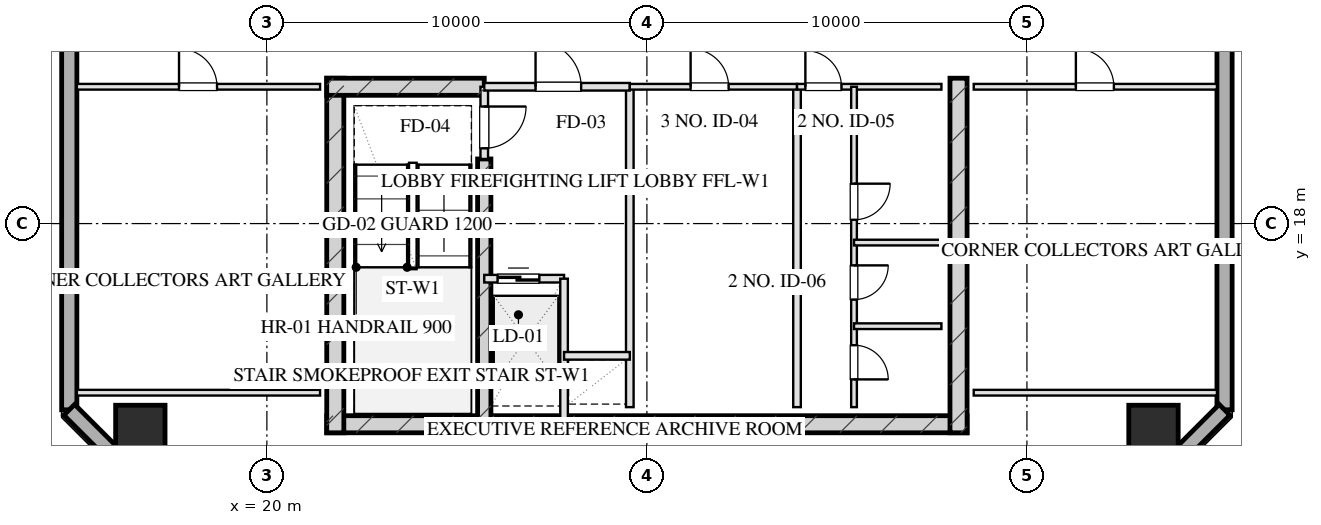
"""IFC4 building model, lengths in metres.
Left out: names, types, materials, properties, quantities, classifications, styles, units other than length and angle.
Written with IfcOpenShell. Run it as: python <this file> out.ifc"""

import sys

from ifc_helpers import new_model, si_unit, direction, frame, frame_2d, origin, origin_2d, place, context, subcontext, project, spatial, rectangle, hollow_rectangle, extrude, element, fill, save


model = new_model("IFC4")
c1 = context("Model", 3, precision=1e-05, world=origin(), true_north=direction((0.0, 1.0)))
c2 = subcontext(c1, "Body", "Model", "MODEL_VIEW")
j1 = project(units=[si_unit("LENGTHUNIT", "METRE"), si_unit("PLANEANGLEUNIT", "RADIAN")], contexts=[c1])
p1 = place(None, origin())
s1 = spatial("IfcSite", under=j1, at=p1, CompositionType="ELEMENT")
p2 = place(p1, origin())
s2 = spatial("IfcBuilding", under=s1, at=p2, CompositionType="ELEMENT")
p3 = place(p2, frame((0.0, 0.0, 247.2)))
s3 = spatial("IfcBuildingStorey", under=s2, at=p3, CompositionType="ELEMENT", Elevation=247.2)
p4 = place(p3, frame((21.575, 12.72, 0.0), z_axis=(0.0, 0.0, 1.0), x_axis=(1.0, 0.0, 0.0)))
e1 = element("IfcWall", 1, at=p4, inside=s3, PredefinedType="SHEAR", context=c2, shape_type="SweptSolid", body=[
    extrude(rectangle(XDim=16.85, YDim=0.45, at=frame_2d((8.425, 0.0))), origin(), (0.0, 0.0, 1.0), 3.2),
])
for number, where, z_axis, x_axis in (
    (2, (21.8, 21.825, 0.0), (0.0, 0.0, 1.0), (0.0, -1.0, 0.0)),
    (3, (38.2, 21.825, 0.0), (0.0, 0.0, 1.0), (0.0, -1.0, 0.0)),
):
    element("IfcWall", number, at=place(p3, frame(where, z_axis=z_axis, x_axis=x_axis)), inside=s3, PredefinedType="SHEAR", context=c2, shape_type="SweptSolid", body=[
        extrude(rectangle(XDim=9.33, YDim=0.45, at=frame_2d((4.665, 0.0))), origin(), (0.0, 0.0, 1.0), 3.2),
    ])
p5 = place(p3, frame((25.72, 19.7, 0.0), z_axis=(0.0, 0.0, 1.0), x_axis=(0.0, -1.0, 0.0)))
e4 = element("IfcWall", 4, at=p5, inside=s3, PredefinedType="SHEAR", context=c2, shape_type="SweptSolid", body=[
    extrude(rectangle(XDim=6.98, YDim=0.35, at=frame_2d((3.49, 0.0))), origin(), (0.0, 0.0, 1.0), 3.2),
])
p6 = place(p3, frame((21.575, 21.6, 0.0), z_axis=(0.0, 0.0, 1.0), x_axis=(1.0, 0.0, 0.0)))
e5 = element("IfcWall", 5, at=p6, inside=s3, PredefinedType="SHEAR", context=c2, shape_type="SweptSolid", body=[
    extrude(rectangle(XDim=4.145, YDim=0.45, at=frame_2d((2.073, 0.0))), origin(), (0.0, 0.0, 1.0), 3.2),
])
for number, where, z_axis, x_axis in (
    (6, (16.67, 12.57, 0.0), (0.0, 0.0, 1.0), (1.0, 0.0, 0.0)),
    (7, (43.33, 12.57, 0.0), (0.0, 0.0, 1.0), (1.0, 0.0, 0.0)),
):
    element("IfcColumn", number, at=place(p3, frame(where, z_axis=z_axis, x_axis=x_axis)), inside=s3, PredefinedType="COLUMN", context=c2, shape_type="SweptSolid", body=[
        extrude(hollow_rectangle(XDim=1.3, YDim=1.3, WallThickness=0.045, at=origin_2d()), origin(), (0.0, 0.0, 1.0), 3.201),
    ])
p7 = place(p3, frame((14.8, 13.1, 0.0), z_axis=(0.0, 0.0, 1.0), x_axis=(0.0, 1.0, 0.0)))
e8 = element("IfcWall", 8, at=p7, inside=s3, PredefinedType="SOLIDWALL", context=c2, shape_type="SweptSolid", body=[
    extrude(rectangle(XDim=41.8, YDim=0.4, at=frame_2d((20.9, 0.0))), origin(), (0.0, 0.0, 1.0), 2.36),
])
p8 = place(p7, frame((13.525, 0.0, 0.75)))
e9 = element("IfcOpeningElement", 9, at=p8, cuts=e8, PredefinedType="OPENING", context=c2, shape_type="SweptSolid", body=[
    extrude(rectangle(XDim=1.95, YDim=1.21, at=frame_2d((0.975, 0.605))), frame((0.0, 0.21, 0.0), z_axis=(0.0, -1.0, 0.0), x_axis=(1.0, 0.0, 0.0)), (0.0, 0.0, 1.0), 0.42),
])
p9 = place(p7, frame((17.325, 0.0, 0.75)))
e10 = element("IfcOpeningElement", 10, at=p9, cuts=e8, PredefinedType="OPENING", context=c2, shape_type="SweptSolid", body=[
    extrude(rectangle(XDim=1.95, YDim=1.21, at=frame_2d((0.975, 0.605))), frame((0.0, 0.21, 0.0), z_axis=(0.0, -1.0, 0.0), x_axis=(1.0, 0.0, 0.0)), (0.0, 0.0, 1.0), 0.42),
])
p10 = place(p7, frame((23.2, 0.0, 0.0)))
e11 = element("IfcOpeningElement", 11, at=p10, cuts=e8, PredefinedType="OPENING", context=c2, shape_type="SweptSolid", body=[
    extrude(rectangle(XDim=1.1, YDim=2.15, at=frame_2d((0.55, 1.075))), frame((0.0, 0.21, 0.0), z_axis=(0.0, -1.0, 0.0), x_axis=(1.0, 0.0, 0.0)), (0.0, 0.0, 1.0), 0.42),
])
p11 = place(p3, frame((45.2, 54.9, 0.0), z_axis=(0.0, 0.0, 1.0), x_axis=(0.0, -1.0, 0.0)))
e12 = element("IfcWall", 12, at=p11, inside=s3, PredefinedType="SOLIDWALL", context=c2, shape_type="SweptSolid", body=[
    extrude(rectangle(XDim=41.8, YDim=0.4, at=frame_2d((20.9, 0.0))), origin(), (0.0, 0.0, 1.0), 2.36),
])
p12 = place(p11, frame((26.325, 0.0, 0.75)))
e13 = element("IfcOpeningElement", 13, at=p12, cuts=e12, PredefinedType="OPENING", context=c2, shape_type="SweptSolid", body=[
    extrude(rectangle(XDim=1.95, YDim=1.21, at=frame_2d((0.975, 0.605))), frame((0.0, 0.21, 0.0), z_axis=(0.0, -1.0, 0.0), x_axis=(1.0, 0.0, 0.0)), (0.0, 0.0, 1.0), 0.42),
])
p13 = place(p11, frame((22.525, 0.0, 0.75)))
e14 = element("IfcOpeningElement", 14, at=p13, cuts=e12, PredefinedType="OPENING", context=c2, shape_type="SweptSolid", body=[
    extrude(rectangle(XDim=1.95, YDim=1.21, at=frame_2d((0.975, 0.605))), frame((0.0, 0.21, 0.0), z_axis=(0.0, -1.0, 0.0), x_axis=(1.0, 0.0, 0.0)), (0.0, 0.0, 1.0), 0.42),
])
p14 = place(p11, frame((17.5, 0.0, 0.0)))
e15 = element("IfcOpeningElement", 15, at=p14, cuts=e12, PredefinedType="OPENING", context=c2, shape_type="SweptSolid", body=[
    extrude(rectangle(XDim=1.1, YDim=2.15, at=frame_2d((0.55, 1.075))), frame((0.0, 0.21, 0.0), z_axis=(0.0, -1.0, 0.0), x_axis=(1.0, 0.0, 0.0)), (0.0, 0.0, 1.0), 0.42),
])
for number, where, z_axis, x_axis in (
    (16, (45.2, 13.1, 0.0), (0.0, 0.0, 1.0), (-0.707, -0.707, 0.0)),
    (17, (17.2, 10.7, 0.0), (0.0, 0.0, 1.0), (-0.707, 0.707, 0.0)),
):
    element("IfcWall", number, at=place(p3, frame(where, z_axis=z_axis, x_axis=x_axis)), inside=s3, PredefinedType="SOLIDWALL", context=c2, shape_type="SweptSolid", body=[
        extrude(rectangle(XDim=3.394, YDim=0.4, at=frame_2d((1.697, 0.0))), origin(), (0.0, 0.0, 1.0), 2.36),
    ])
p15 = place(p3, frame((25.72, 21.6, 0.0), z_axis=(0.0, 0.0, 1.0), x_axis=(0.0, -1.0, 0.0)))
e18 = element("IfcWall", 18, at=p15, inside=s3, PredefinedType="PARTITIONING", context=c2, shape_type="SweptSolid", body=[
    extrude(rectangle(XDim=1.9, YDim=0.2, at=frame_2d((0.95, 0.0))), origin(), (0.0, 0.0, 1.0), 2.925),
])
p16 = place(p15, frame((0.52, 0.0, 0.0)))
e19 = element("IfcOpeningElement", 19, at=p16, cuts=e18, PredefinedType="OPENING", context=c2, shape_type="SweptSolid", body=[
    extrude(rectangle(XDim=1.1, YDim=2.05, at=frame_2d((0.55, 1.025))), frame((0.0, 0.11, 0.0), z_axis=(0.0, -1.0, 0.0), x_axis=(1.0, 0.0, 0.0)), (0.0, 0.0, 1.0), 0.22),
])
p17 = place(p3, frame((29.55, 21.6, 0.0), z_axis=(0.0, 0.0, 1.0), x_axis=(0.0, -1.0, 0.0)))
e20 = element("IfcWall", 20, at=p17, inside=s3, PredefinedType="PARTITIONING", context=c2, shape_type="SweptSolid", body=[
    extrude(rectangle(XDim=8.43, YDim=0.2, at=frame_2d((4.215, 0.0))), origin(), (0.0, 0.0, 1.0), 2.925),
])
p18 = place(p3, frame((25.72, 21.6, 0.0), z_axis=(0.0, 0.0, 1.0), x_axis=(1.0, 0.0, 0.0)))
e21 = element("IfcWall", 21, at=p18, inside=s3, PredefinedType="PARTITIONING", context=c2, shape_type="SweptSolid", body=[
    extrude(rectangle(XDim=3.83, YDim=0.2, at=frame_2d((1.915, 0.0))), origin(), (0.0, 0.0, 1.0), 2.925),
])
p19 = place(p18, frame((1.35, 0.0, 0.0)))
e22 = element("IfcOpeningElement", 22, at=p19, cuts=e21, PredefinedType="OPENING", context=c2, shape_type="SweptSolid", body=[
    extrude(rectangle(XDim=1.2, YDim=2.05, at=frame_2d((0.6, 1.025))), frame((0.0, 0.11, 0.0), z_axis=(0.0, -1.0, 0.0), x_axis=(1.0, 0.0, 0.0)), (0.0, 0.0, 1.0), 0.22),
])
p20 = place(p3, frame((25.72, 16.55, 0.0), z_axis=(0.0, 0.0, 1.0), x_axis=(1.0, 0.0, 0.0)))
e23 = element("IfcWall", 23, at=p20, inside=s3, PredefinedType="PARTITIONING", context=c2, shape_type="SweptSolid", body=[
    extrude(rectangle(XDim=2.1, YDim=0.2, at=frame_2d((1.05, 0.0))), origin(), (0.0, 0.0, 1.0), 2.925),
])
p21 = place(p20, frame((0.35, 0.0, 0.0)))
e24 = element("IfcOpeningElement", 24, at=p21, cuts=e23, PredefinedType="OPENING", context=c2, shape_type="SweptSolid", body=[
    extrude(rectangle(XDim=1.1, YDim=2.05, at=frame_2d((0.55, 1.025))), frame((0.0, 0.11, 0.0), z_axis=(0.0, -1.0, 0.0), x_axis=(1.0, 0.0, 0.0)), (0.0, 0.0, 1.0), 0.22),
])
p22 = place(p3, frame((27.82, 16.55, 0.0), z_axis=(0.0, 0.0, 1.0), x_axis=(0.0, -1.0, 0.0)))
e25 = element("IfcWall", 25, at=p22, inside=s3, PredefinedType="PARTITIONING", context=c2, shape_type="SweptSolid", body=[
    extrude(rectangle(XDim=3.7, YDim=0.2, at=frame_2d((1.85, 0.0))), origin(), (0.0, 0.0, 1.0), 2.925),
])
p23 = place(p3, frame((27.82, 14.52, 0.0), z_axis=(0.0, 0.0, 1.0), x_axis=(1.0, 0.0, 0.0)))
e26 = element("IfcWall", 26, at=p23, inside=s3, PredefinedType="PARTITIONING", context=c2, shape_type="SweptSolid", body=[
    extrude(rectangle(XDim=1.73, YDim=0.2, at=frame_2d((0.865, 0.0))), origin(), (0.0, 0.0, 1.0), 2.925),
])
p24 = place(p3, frame((33.95, 21.6, 0.0), z_axis=(0.0, 0.0, 1.0), x_axis=(0.0, -1.0, 0.0)))
e27 = element("IfcWall", 27, at=p24, inside=s3, PredefinedType="PARTITIONING", context=c2, shape_type="SweptSolid", body=[
    extrude(rectangle(XDim=8.43, YDim=0.2, at=frame_2d((4.215, 0.0))), origin(), (0.0, 0.0, 1.0), 2.925),
])
p25 = place(p3, frame((29.55, 21.6, 0.0), z_axis=(0.0, 0.0, 1.0), x_axis=(1.0, 0.0, 0.0)))
e28 = element("IfcWall", 28, at=p25, inside=s3, PredefinedType="PARTITIONING", context=c2, shape_type="SweptSolid", body=[
    extrude(rectangle(XDim=4.4, YDim=0.15, at=frame_2d((2.2, 0.0))), origin(), (0.0, 0.0, 1.0), 2.925),
])
p26 = place(p25, frame((1.6, 0.0, 0.0)))
e29 = element("IfcOpeningElement", 29, at=p26, cuts=e28, PredefinedType="OPENING", context=c2, shape_type="SweptSolid", body=[
    extrude(rectangle(XDim=1.0, YDim=2.05, at=frame_2d((0.5, 1.025))), frame((0.0, 0.085, 0.0), z_axis=(0.0, -1.0, 0.0), x_axis=(1.0, 0.0, 0.0)), (0.0, 0.0, 1.0), 0.17),
])
p27 = place(p3, frame((33.95, 21.6, 0.0), z_axis=(0.0, 0.0, 1.0), x_axis=(1.0, 0.0, 0.0)))
e30 = element("IfcWall", 30, at=p27, inside=s3, PredefinedType="PARTITIONING", context=c2, shape_type="SweptSolid", body=[
    extrude(rectangle(XDim=3.8, YDim=0.15, at=frame_2d((1.9, 0.0))), origin(), (0.0, 0.0, 1.0), 2.925),
])
p28 = place(p27, frame((0.22, 0.0, 0.0)))
e31 = element("IfcOpeningElement", 31, at=p28, cuts=e30, PredefinedType="OPENING", context=c2, shape_type="SweptSolid", body=[
    extrude(rectangle(XDim=0.95, YDim=2.05, at=frame_2d((0.475, 1.025))), frame((0.0, 0.085, 0.0), z_axis=(0.0, -1.0, 0.0), x_axis=(1.0, 0.0, 0.0)), (0.0, 0.0, 1.0), 0.17),
])
p29 = place(p3, frame((35.45, 21.6, 0.0), z_axis=(0.0, 0.0, 1.0), x_axis=(0.0, -1.0, 0.0)))
e32 = element("IfcWall", 32, at=p29, inside=s3, PredefinedType="PARTITIONING", context=c2, shape_type="SweptSolid", body=[
    extrude(rectangle(XDim=8.43, YDim=0.15, at=frame_2d((4.215, 0.0))), origin(), (0.0, 0.0, 1.0), 2.565),
])
p30 = place(p29, frame((2.55, 0.0, 0.0)))
e33 = element("IfcOpeningElement", 33, at=p30, cuts=e32, PredefinedType="OPENING", context=c2, shape_type="SweptSolid", body=[
    extrude(rectangle(XDim=0.95, YDim=2.05, at=frame_2d((0.475, 1.025))), frame((0.0, 0.085, 0.0), z_axis=(0.0, -1.0, 0.0), x_axis=(1.0, 0.0, 0.0)), (0.0, 0.0, 1.0), 0.17),
])
p31 = place(p29, frame((4.7, 0.0, 0.0)))
e34 = element("IfcOpeningElement", 34, at=p31, cuts=e32, PredefinedType="OPENING", context=c2, shape_type="SweptSolid", body=[
    extrude(rectangle(XDim=0.9, YDim=2.05, at=frame_2d((0.45, 1.025))), frame((0.0, 0.085, 0.0), z_axis=(0.0, -1.0, 0.0), x_axis=(1.0, 0.0, 0.0)), (0.0, 0.0, 1.0), 0.17),
])
p32 = place(p29, frame((6.8, 0.0, 0.0)))
e35 = element("IfcOpeningElement", 35, at=p32, cuts=e32, PredefinedType="OPENING", context=c2, shape_type="SweptSolid", body=[
    extrude(rectangle(XDim=0.9, YDim=2.05, at=frame_2d((0.45, 1.025))), frame((0.0, 0.085, 0.0), z_axis=(0.0, -1.0, 0.0), x_axis=(1.0, 0.0, 0.0)), (0.0, 0.0, 1.0), 0.17),
])
for number, where, z_axis, x_axis in (
    (36, (35.45, 17.5, 0.0), (0.0, 0.0, 1.0), (1.0, 0.0, 0.0)),
    (37, (35.45, 15.3, 0.0), (0.0, 0.0, 1.0), (1.0, 0.0, 0.0)),
):
    element("IfcWall", number, at=place(p3, frame(where, z_axis=z_axis, x_axis=x_axis)), inside=s3, PredefinedType="PARTITIONING", context=c2, shape_type="SweptSolid", body=[
        extrude(rectangle(XDim=2.3, YDim=0.15, at=frame_2d((1.15, 0.0))), origin(), (0.0, 0.0, 1.0), 2.925),
    ])
p33 = place(p3, frame((15.0, 13.55, 0.0), z_axis=(0.0, 0.0, 1.0), x_axis=(1.0, 0.0, 0.0)))
e38 = element("IfcWall", 38, at=p33, inside=s3, PredefinedType="PARTITIONING", context=c2, shape_type="SweptSolid", body=[
    extrude(rectangle(XDim=6.4, YDim=0.15, at=frame_2d((3.2, 0.0))), origin(), (0.0, 0.0, 1.0), 2.925),
])
p34 = place(p3, frame((15.0, 21.6, 0.0), z_axis=(0.0, 0.0, 1.0), x_axis=(1.0, 0.0, 0.0)))
e39 = element("IfcWall", 39, at=p34, inside=s3, PredefinedType="PARTITIONING", context=c2, shape_type="SweptSolid", body=[
    extrude(rectangle(XDim=6.4, YDim=0.15, at=frame_2d((3.2, 0.0))), origin(), (0.0, 0.0, 1.0), 2.925),
])
p35 = place(p34, frame((2.688, 0.0, 0.0)))
e40 = element("IfcOpeningElement", 40, at=p35, cuts=e39, PredefinedType="OPENING", context=c2, shape_type="SweptSolid", body=[
    extrude(rectangle(XDim=1.0, YDim=2.05, at=frame_2d((0.5, 1.025))), frame((0.0, 0.085, 0.0), z_axis=(0.0, -1.0, 0.0), x_axis=(1.0, 0.0, 0.0)), (0.0, 0.0, 1.0), 0.17),
])
p36 = place(p3, frame((38.6, 13.55, 0.0), z_axis=(0.0, 0.0, 1.0), x_axis=(1.0, 0.0, 0.0)))
e41 = element("IfcWall", 41, at=p36, inside=s3, PredefinedType="PARTITIONING", context=c2, shape_type="SweptSolid", body=[
    extrude(rectangle(XDim=6.4, YDim=0.15, at=frame_2d((3.2, 0.0))), origin(), (0.0, 0.0, 1.0), 2.925),
])
p37 = place(p3, frame((38.6, 21.6, 0.0), z_axis=(0.0, 0.0, 1.0), x_axis=(1.0, 0.0, 0.0)))
e42 = element("IfcWall", 42, at=p37, inside=s3, PredefinedType="PARTITIONING", context=c2, shape_type="SweptSolid", body=[
    extrude(rectangle(XDim=6.4, YDim=0.15, at=frame_2d((3.2, 0.0))), origin(), (0.0, 0.0, 1.0), 2.925),
])
p38 = place(p37, frame((2.688, 0.0, 0.0)))
e43 = element("IfcOpeningElement", 43, at=p38, cuts=e42, PredefinedType="OPENING", context=c2, shape_type="SweptSolid", body=[
    extrude(rectangle(XDim=1.0, YDim=2.05, at=frame_2d((0.5, 1.025))), frame((0.0, 0.085, 0.0), z_axis=(0.0, -1.0, 0.0), x_axis=(1.0, 0.0, 0.0)), (0.0, 0.0, 1.0), 0.17),
])
p39 = place(p16, origin())
e44 = element("IfcDoor", 44, at=p39, inside=s3, OperationType="SINGLE_SWING_LEFT", PredefinedType="DOOR", context=c2, shape_type="SweptSolid", body=[
    extrude(rectangle(XDim=1.1, YDim=2.05, at=frame_2d((0.55, 1.025))), frame((0.0, 0.025, 0.0), z_axis=(0.0, -1.0, 0.0), x_axis=(1.0, 0.0, 0.0)), (0.0, 0.0, 1.0), 0.05),
])
fill(e19, e44)
p40 = place(p19, origin())
e45 = element("IfcDoor", 45, at=p40, inside=s3, OperationType="SINGLE_SWING_LEFT", PredefinedType="DOOR", context=c2, shape_type="SweptSolid", body=[
    extrude(rectangle(XDim=1.2, YDim=2.05, at=frame_2d((0.6, 1.025))), frame((0.0, 0.025, 0.0), z_axis=(0.0, -1.0, 0.0), x_axis=(1.0, 0.0, 0.0)), (0.0, 0.0, 1.0), 0.05),
])
fill(e22, e45)
p41 = place(p21, origin())
e46 = element("IfcDoor", 46, at=p41, inside=s3, OperationType="DOUBLE_DOOR_SLIDING", PredefinedType="DOOR", context=c2, shape_type="SweptSolid", body=[
    extrude(rectangle(XDim=1.1, YDim=2.05, at=frame_2d((0.55, 1.025))), frame((0.0, 0.025, 0.0), z_axis=(0.0, -1.0, 0.0), x_axis=(1.0, 0.0, 0.0)), (0.0, 0.0, 1.0), 0.05),
])
fill(e24, e46)
p42 = place(p26, origin())
e47 = element("IfcDoor", 47, at=p42, inside=s3, OperationType="SINGLE_SWING_LEFT", PredefinedType="DOOR", context=c2, shape_type="SweptSolid", body=[
    extrude(rectangle(XDim=1.0, YDim=2.05, at=frame_2d((0.5, 1.025))), frame((0.0, 0.025, 0.0), z_axis=(0.0, -1.0, 0.0), x_axis=(1.0, 0.0, 0.0)), (0.0, 0.0, 1.0), 0.05),
])
fill(e29, e47)
p43 = place(p28, origin())
e48 = element("IfcDoor", 48, at=p43, inside=s3, OperationType="SINGLE_SWING_LEFT", PredefinedType="DOOR", context=c2, shape_type="SweptSolid", body=[
    extrude(rectangle(XDim=0.95, YDim=2.05, at=frame_2d((0.475, 1.025))), frame((0.0, 0.025, 0.0), z_axis=(0.0, -1.0, 0.0), x_axis=(1.0, 0.0, 0.0)), (0.0, 0.0, 1.0), 0.05),
])
fill(e31, e48)
p44 = place(p30, origin())
e49 = element("IfcDoor", 49, at=p44, inside=s3, OperationType="SINGLE_SWING_LEFT", PredefinedType="DOOR", context=c2, shape_type="SweptSolid", body=[
    extrude(rectangle(XDim=0.95, YDim=2.05, at=frame_2d((0.475, 1.025))), frame((0.0, 0.025, 0.0), z_axis=(0.0, -1.0, 0.0), x_axis=(1.0, 0.0, 0.0)), (0.0, 0.0, 1.0), 0.05),
])
fill(e33, e49)
p45 = place(p31, origin())
e50 = element("IfcDoor", 50, at=p45, inside=s3, OperationType="SINGLE_SWING_LEFT", PredefinedType="DOOR", context=c2, shape_type="SweptSolid", body=[
    extrude(rectangle(XDim=0.9, YDim=2.05, at=frame_2d((0.45, 1.025))), frame((0.0, 0.025, 0.0), z_axis=(0.0, -1.0, 0.0), x_axis=(1.0, 0.0, 0.0)), (0.0, 0.0, 1.0), 0.05),
])
fill(e34, e50)
p46 = place(p32, origin())
e51 = element("IfcDoor", 51, at=p46, inside=s3, OperationType="SINGLE_SWING_RIGHT", PredefinedType="DOOR", context=c2, shape_type="SweptSolid", body=[
    extrude(rectangle(XDim=0.9, YDim=2.05, at=frame_2d((0.45, 1.025))), frame((0.0, 0.025, 0.0), z_axis=(0.0, -1.0, 0.0), x_axis=(1.0, 0.0, 0.0)), (0.0, 0.0, 1.0), 0.05),
])
fill(e35, e51)
p47 = place(p35, origin())
e52 = element("IfcDoor", 52, at=p47, inside=s3, OperationType="SINGLE_SWING_LEFT", PredefinedType="DOOR", context=c2, shape_type="SweptSolid", body=[
    extrude(rectangle(XDim=1.0, YDim=2.05, at=frame_2d((0.5, 1.025))), frame((0.0, 0.025, 0.0), z_axis=(0.0, -1.0, 0.0), x_axis=(1.0, 0.0, 0.0)), (0.0, 0.0, 1.0), 0.05),
])
fill(e40, e52)
p48 = place(p38, origin())
e53 = element("IfcDoor", 53, at=p48, inside=s3, OperationType="SINGLE_SWING_LEFT", PredefinedType="DOOR", context=c2, shape_type="SweptSolid", body=[
    extrude(rectangle(XDim=1.0, YDim=2.05, at=frame_2d((0.5, 1.025))), frame((0.0, 0.025, 0.0), z_axis=(0.0, -1.0, 0.0), x_axis=(1.0, 0.0, 0.0)), (0.0, 0.0, 1.0), 0.05),
])
fill(e43, e53)
save(model, sys.argv[1])
